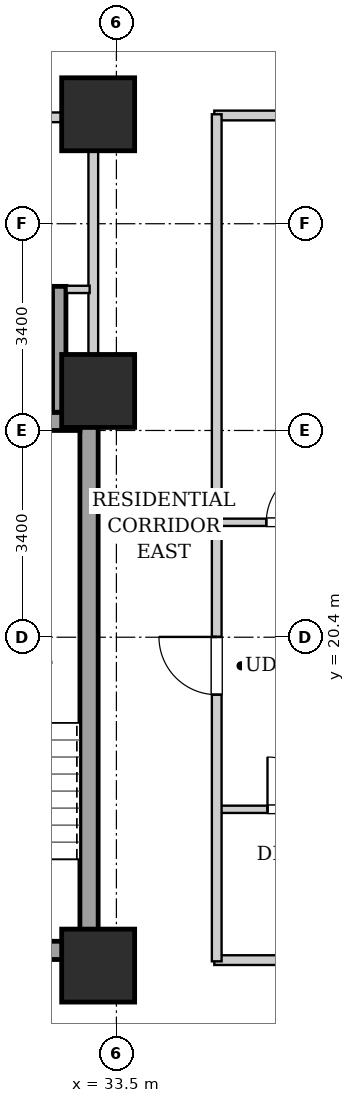
"""IFC4 building model, lengths in metres.
Left out: names, types, materials, properties, quantities, classifications, styles, units other than length and angle.
Written with IfcOpenShell. Run it as: python <this file> out.ifc"""

import sys

from ifc_helpers import new_model, si_unit, direction, frame, frame_2d, origin, origin_2d, place, context, subcontext, project, spatial, rectangle, extrude, element, fill, save


model = new_model("IFC4")
c1 = context("Model", 3, precision=1e-05, world=origin(), true_north=direction((0.0, 1.0)))
c2 = subcontext(c1, "Body", "Model", "MODEL_VIEW")
j1 = project(units=[si_unit("LENGTHUNIT", "METRE"), si_unit("PLANEANGLEUNIT", "RADIAN")], contexts=[c1])
p1 = place(None, origin())
s1 = spatial("IfcSite", under=j1, at=p1, CompositionType="ELEMENT")
p2 = place(p1, origin())
s2 = spatial("IfcBuilding", under=s1, at=p2, CompositionType="ELEMENT")
p3 = place(p2, frame((0.0, 0.0, 67.4)))
s3 = spatial("IfcBuildingStorey", under=s2, at=p3, CompositionType="ELEMENT", Elevation=67.4)
for number, where, z_axis, x_axis in (
    (1, (33.2, 15.0, 0.0), (0.0, 0.0, 1.0), (1.0, 0.0, 0.0)),
    (2, (33.2, 29.0, 0.0), (0.0, 0.0, 1.0), (1.0, 0.0, 0.0)),
    (3, (33.2, 24.45, 0.0), (0.0, 0.0, 1.0), (1.0, 0.0, 0.0)),
):
    element("IfcColumn", number, at=place(p3, frame(where, z_axis=z_axis, x_axis=x_axis)), inside=s3, PredefinedType="COLUMN", context=c2, shape_type="SweptSolid", body=[
        extrude(rectangle(XDim=1.2, YDim=1.2, at=origin_2d()), origin(), (0.0, 0.0, 1.0), 3.2),
    ])
p4 = place(p3, frame((33.05, 15.1, 0.0), z_axis=(0.0, 0.0, 1.0), x_axis=(0.0, 1.0, 0.0)))
e4 = element("IfcWall", 4, at=p4, inside=s3, PredefinedType="SHEAR", context=c2, shape_type="SweptSolid", body=[
    extrude(rectangle(XDim=9.0, YDim=0.3, at=frame_2d((4.5, 0.0))), origin(), (0.0, 0.0, 1.0), 2.88),
])
p5 = place(p3, frame((30.05, 23.95, 0.0), z_axis=(0.0, 0.0, 1.0), x_axis=(1.0, 0.0, 0.0)))
e5 = element("IfcWall", 5, at=p5, inside=s3, PredefinedType="SHEAR", context=c2, shape_type="SweptSolid", body=[
    extrude(rectangle(XDim=2.85, YDim=0.3, at=frame_2d((1.425, 0.0))), origin(), (0.0, 0.0, 1.0), 2.88),
])
p6 = place(p3, frame((30.05, 15.25, 0.0), z_axis=(0.0, 0.0, 1.0), x_axis=(1.0, 0.0, 0.0)))
e6 = element("IfcWall", 6, at=p6, inside=s3, PredefinedType="SHEAR", context=c2, shape_type="SweptSolid", body=[
    extrude(rectangle(XDim=2.85, YDim=0.3, at=frame_2d((1.425, 0.0))), origin(), (0.0, 0.0, 1.0), 2.88),
])
p7 = place(p6, frame((0.86, 0.0, 0.0)))
e7 = element("IfcOpeningElement", 7, at=p7, cuts=e6, PredefinedType="OPENING", context=c2, shape_type="SweptSolid", body=[
    extrude(rectangle(XDim=1.1, YDim=2.05, at=frame_2d((0.55, 1.025))), frame((0.0, 0.16, 0.0), z_axis=(0.0, -1.0, 0.0), x_axis=(1.0, 0.0, 0.0)), (0.0, 0.0, 1.0), 0.32),
])
p8 = place(p3, frame((32.56, 24.1, 0.0), z_axis=(0.0, 0.0, 1.0), x_axis=(0.0, 1.0, 0.0)))
e8 = element("IfcWall", 8, at=p8, inside=s3, PredefinedType="SHEAR", context=c2, shape_type="SweptSolid", body=[
    extrude(rectangle(XDim=2.07, YDim=0.22, at=frame_2d((1.035, 0.0))), origin(), (0.0, 0.0, 1.0), 2.88),
])
p9 = place(p3, frame((33.12, 24.12, 0.0), z_axis=(0.0, 0.0, 1.0), x_axis=(0.0, 1.0, 0.0)))
e9 = element("IfcWall", 9, at=p9, inside=s3, PredefinedType="PARTITIONING", context=c2, shape_type="SweptSolid", body=[
    extrude(rectangle(XDim=4.76, YDim=0.16, at=frame_2d((2.38, 0.0))), origin(), (0.0, 0.0, 1.0), 2.215),
])
p10 = place(p3, frame((32.68, 26.12, 0.0), z_axis=(0.0, 0.0, 1.0), x_axis=(1.0, 0.0, 0.0)))
e10 = element("IfcWall", 10, at=p10, inside=s3, PredefinedType="PARTITIONING", context=c2, shape_type="SweptSolid", body=[
    extrude(rectangle(XDim=0.38, YDim=0.12, at=frame_2d((0.19, 0.0))), origin(), (0.0, 0.0, 1.0), 2.88),
])
p11 = place(p3, frame((30.08, 28.95, 0.0), z_axis=(0.0, 0.0, 1.0), x_axis=(1.0, 0.0, 0.0)))
e11 = element("IfcWall", 11, at=p11, inside=s3, PredefinedType="PARTITIONING", context=c2, shape_type="SweptSolid", body=[
    extrude(rectangle(XDim=2.96, YDim=0.16, at=frame_2d((1.48, 0.0))), origin(), (0.0, 0.0, 1.0), 2.88),
])
p12 = place(p11, frame((1.045, 0.0, 0.0)))
e12 = element("IfcOpeningElement", 12, at=p12, cuts=e11, PredefinedType="OPENING", context=c2, shape_type="SweptSolid", body=[
    extrude(rectangle(XDim=0.86, YDim=2.05, at=frame_2d((0.43, 1.025))), frame((0.0, 0.09, 0.0), z_axis=(0.0, -1.0, 0.0), x_axis=(1.0, 0.0, 0.0)), (0.0, 0.0, 1.0), 0.18),
])
for number, where, z_axis, x_axis in (
    (13, (35.11, 15.09, 0.0), (0.0, 0.0, 1.0), (1.0, 0.0, 0.0)),
    (14, (35.11, 28.98, 0.0), (0.0, 0.0, 1.0), (1.0, 0.0, 0.0)),
):
    element("IfcWall", number, at=place(p3, frame(where, z_axis=z_axis, x_axis=x_axis)), inside=s3, PredefinedType="PARTITIONING", context=c2, shape_type="SweptSolid", body=[
        extrude(rectangle(XDim=11.11, YDim=0.16, at=frame_2d((5.555, 0.0))), origin(), (0.0, 0.0, 1.0), 2.172),
    ])
p13 = place(p3, frame((35.19, 22.29, 0.0), z_axis=(0.0, 0.0, 1.0), x_axis=(1.0, 0.0, 0.0)))
e15 = element("IfcWall", 15, at=p13, inside=s3, PredefinedType="PARTITIONING", context=c2, shape_type="SweptSolid", body=[
    extrude(rectangle(XDim=2.45, YDim=0.12, at=frame_2d((1.225, 0.0))), origin(), (0.0, 0.0, 1.0), 2.88),
])
p14 = place(p13, frame((0.775, 0.0, 0.0)))
e16 = element("IfcOpeningElement", 16, at=p14, cuts=e15, PredefinedType="OPENING", context=c2, shape_type="SweptSolid", body=[
    extrude(rectangle(XDim=0.9, YDim=2.05, at=frame_2d((0.45, 1.025))), frame((0.0, 0.07, 0.0), z_axis=(0.0, -1.0, 0.0), x_axis=(1.0, 0.0, 0.0)), (0.0, 0.0, 1.0), 0.14),
])
p15 = place(p3, frame((35.19, 17.57, 0.0), z_axis=(0.0, 0.0, 1.0), x_axis=(1.0, 0.0, 0.0)))
e17 = element("IfcWall", 17, at=p15, inside=s3, PredefinedType="PARTITIONING", context=c2, shape_type="SweptSolid", body=[
    extrude(rectangle(XDim=2.45, YDim=0.12, at=frame_2d((1.225, 0.0))), origin(), (0.0, 0.0, 1.0), 2.88),
])
p16 = place(p15, frame((0.795, 0.0, 0.0)))
e18 = element("IfcOpeningElement", 18, at=p16, cuts=e17, PredefinedType="OPENING", context=c2, shape_type="SweptSolid", body=[
    extrude(rectangle(XDim=0.86, YDim=2.05, at=frame_2d((0.43, 1.025))), frame((0.0, 0.07, 0.0), z_axis=(0.0, -1.0, 0.0), x_axis=(1.0, 0.0, 0.0)), (0.0, 0.0, 1.0), 0.14),
])
p17 = place(p3, frame((35.15, 15.07, 0.0), z_axis=(0.0, 0.0, 1.0), x_axis=(0.0, 1.0, 0.0)))
e19 = element("IfcWall", 19, at=p17, inside=s3, PredefinedType="PARTITIONING", context=c2, shape_type="SweptSolid", body=[
    extrude(rectangle(XDim=13.93, YDim=0.16, at=frame_2d((6.965, 0.0))), origin(), (0.0, 0.0, 1.0), 2.88),
])
p18 = place(p17, frame((4.385, 0.0, 0.0)))
e20 = element("IfcOpeningElement", 20, at=p18, cuts=e19, PredefinedType="OPENING", context=c2, shape_type="SweptSolid", body=[
    extrude(rectangle(XDim=0.95, YDim=2.1, at=frame_2d((0.475, 1.05))), frame((0.0, 0.09, 0.0), z_axis=(0.0, -1.0, 0.0), x_axis=(1.0, 0.0, 0.0)), (0.0, 0.0, 1.0), 0.18),
])
p19 = place(p14, origin())
e21 = element("IfcDoor", 21, at=p19, inside=s3, OperationType="SINGLE_SWING_RIGHT", PredefinedType="DOOR", context=c2, shape_type="SweptSolid", body=[
    extrude(rectangle(XDim=0.9, YDim=2.05, at=frame_2d((0.45, 1.025))), frame((0.0, 0.025, 0.0), z_axis=(0.0, -1.0, 0.0), x_axis=(1.0, 0.0, 0.0)), (0.0, 0.0, 1.0), 0.05),
])
fill(e16, e21)
p20 = place(p16, origin())
e22 = element("IfcDoor", 22, at=p20, inside=s3, OperationType="SINGLE_SWING_LEFT", PredefinedType="DOOR", context=c2, shape_type="SweptSolid", body=[
    extrude(rectangle(XDim=0.86, YDim=2.05, at=frame_2d((0.43, 1.025))), frame((0.0, 0.025, 0.0), z_axis=(0.0, -1.0, 0.0), x_axis=(1.0, 0.0, 0.0)), (0.0, 0.0, 1.0), 0.05),
])
fill(e18, e22)
p21 = place(p18, origin())
e23 = element("IfcDoor", 23, at=p21, inside=s3, OperationType="SINGLE_SWING_RIGHT", PredefinedType="DOOR", context=c2, shape_type="SweptSolid", body=[
    extrude(rectangle(XDim=0.95, YDim=2.1, at=frame_2d((0.475, 1.05))), frame((0.0, 0.025, 0.0), z_axis=(0.0, -1.0, 0.0), x_axis=(1.0, 0.0, 0.0)), (0.0, 0.0, 1.0), 0.05),
])
fill(e20, e23)
save(model, sys.argv[1])
